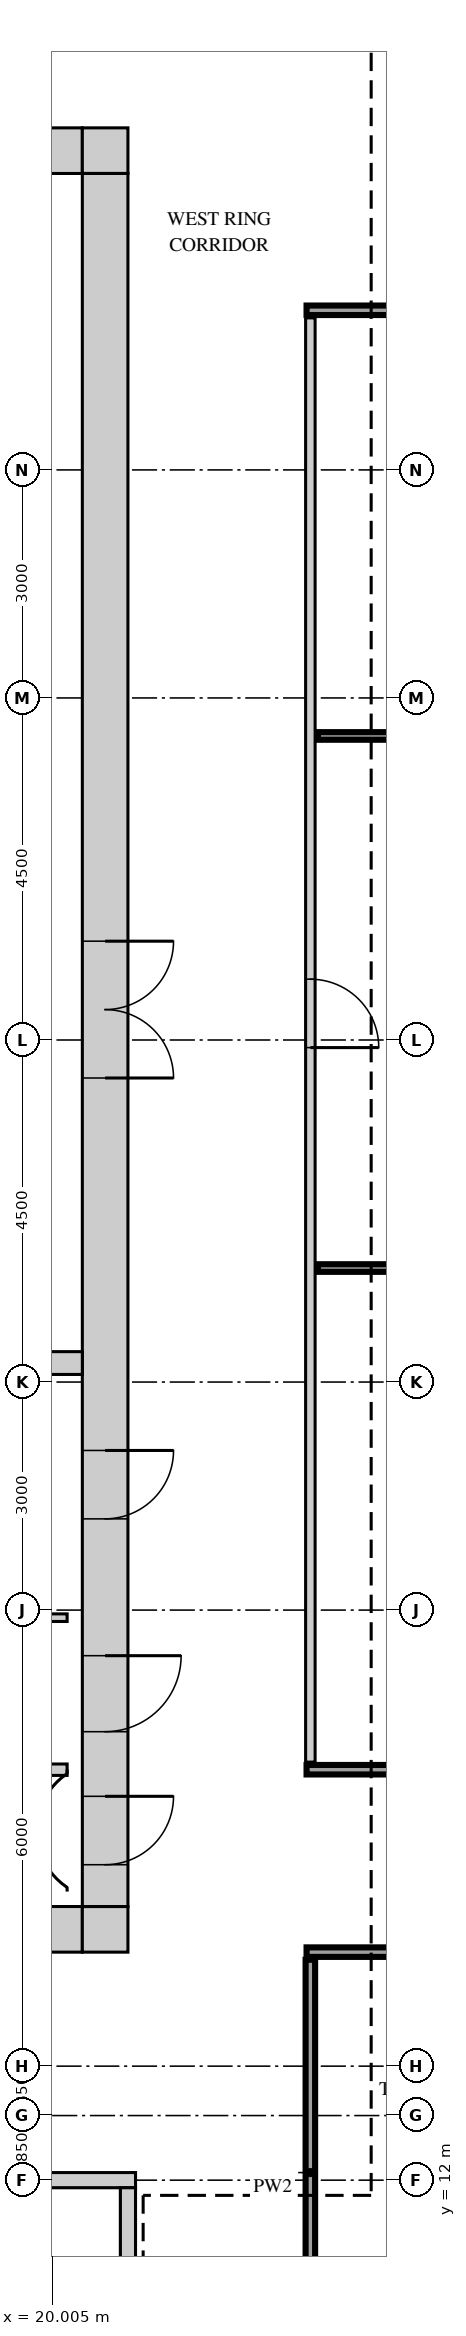
"""IFC4 building model, lengths in metres.
Left out: names, types, materials, properties, quantities, classifications, styles, units other than length and angle.
Written with IfcOpenShell. Run it as: python <this file> out.ifc"""

import sys

from ifc_helpers import new_model, si_unit, direction, frame, frame_2d, origin, place, context, subcontext, project, spatial, rectangle, extrude, source, transform, mapped, element, fill, save


model = new_model("IFC4")
c1 = context("Model", 3, precision=1e-05, world=origin(), true_north=direction((0.0, 1.0)))
c2 = subcontext(c1, "Body", "Model", "MODEL_VIEW")
j1 = project(units=[si_unit("LENGTHUNIT", "METRE"), si_unit("PLANEANGLEUNIT", "RADIAN")], contexts=[c1])
p1 = place(None, origin())
s1 = spatial("IfcSite", under=j1, at=p1, CompositionType="ELEMENT")
p2 = place(p1, origin())
s2 = spatial("IfcBuilding", under=s1, at=p2, CompositionType="ELEMENT")
p3 = place(p2, frame((0.0, 0.0, 286.2)))
s3 = spatial("IfcBuildingStorey", under=s2, at=p3, CompositionType="ELEMENT", Elevation=286.2)
m1 = source(origin(), c2, "Body", "SweptSolid", [
    extrude(rectangle(XDim=14.4, YDim=0.6, at=frame_2d((7.2, 0.0))), origin(), (0.0, 0.0, 1.0), 3.75),
])
p4 = place(p3, frame((6.0, 38.7, 0.0), z_axis=(0.0, 0.0, 1.0), x_axis=(1.0, 0.0, 0.0)))
e1 = element("IfcWall", 1, at=p4, inside=s3, PredefinedType="SHEAR", context=c2, shape_type="MappedRepresentation", body=[
    mapped(m1, transform((0.0, 0.0, 0.0))),
])
m2 = source(origin(), c2, "Body", "SweptSolid", [
    extrude(rectangle(XDim=0.9, YDim=2.1, at=frame_2d((0.45, 1.05))), frame((0.0, 0.31, 0.0), z_axis=(0.0, -1.0, 0.0), x_axis=(1.0, 0.0, 0.0)), (0.0, 0.0, 1.0), 0.62),
])
p5 = place(p4, frame((2.55, 0.0, 0.0)))
e2 = element("IfcOpeningElement", 2, at=p5, cuts=e1, PredefinedType="OPENING", context=c2, shape_type="MappedRepresentation", body=[
    mapped(m2, transform((0.0, 0.0, 0.0))),
])
p6 = place(p4, frame((7.0, 0.0, 0.0)))
e3 = element("IfcOpeningElement", 3, at=p6, cuts=e1, PredefinedType="OPENING", context=c2, shape_type="MappedRepresentation", body=[
    mapped(m2, transform((0.0, 0.0, 0.0))),
])
p7 = place(p4, frame((11.5, 0.0, 0.0)))
e4 = element("IfcOpeningElement", 4, at=p7, cuts=e1, PredefinedType="OPENING", context=c2, shape_type="MappedRepresentation", body=[
    mapped(m2, transform((0.0, 0.0, 0.0))),
])
m3 = source(origin(), c2, "Body", "SweptSolid", [
    extrude(rectangle(XDim=0.6, YDim=0.6, at=frame_2d((0.3, 0.0))), origin(), (0.0, 0.0, 1.0), 3.75),
])
p8 = place(p3, frame((20.4, 38.7, 0.0), z_axis=(0.0, 0.0, 1.0), x_axis=(1.0, 0.0, 0.0)))
e5 = element("IfcWall", 5, at=p8, inside=s3, PredefinedType="SHEAR", context=c2, shape_type="MappedRepresentation", body=[
    mapped(m3, transform((0.0, 0.0, 0.0))),
])
p9 = place(p3, frame((6.0, 15.3, 0.0), z_axis=(0.0, 0.0, 1.0), x_axis=(1.0, 0.0, 0.0)))
e6 = element("IfcWall", 6, at=p9, inside=s3, PredefinedType="SHEAR", context=c2, shape_type="MappedRepresentation", body=[
    mapped(m1, transform((0.0, 0.0, 0.0))),
])
m4 = source(origin(), c2, "Body", "SweptSolid", [
    extrude(rectangle(XDim=1.2, YDim=2.1, at=frame_2d((0.6, 1.05))), frame((0.0, 0.31, 0.0), z_axis=(0.0, -1.0, 0.0), x_axis=(1.0, 0.0, 0.0)), (0.0, 0.0, 1.0), 0.62),
])
p10 = place(p9, frame((6.2, 0.0, 0.0)))
e7 = element("IfcOpeningElement", 7, at=p10, cuts=e6, PredefinedType="OPENING", context=c2, shape_type="MappedRepresentation", body=[
    mapped(m4, transform((0.0, 0.0, 0.0))),
])
p11 = place(p9, frame((2.85, 0.0, 0.0)))
e8 = element("IfcOpeningElement", 8, at=p11, cuts=e6, PredefinedType="OPENING", context=c2, shape_type="MappedRepresentation", body=[
    mapped(m4, transform((0.0, 0.0, 0.0))),
])
m5 = source(origin(), c2, "Body", "SweptSolid", [
    extrude(rectangle(XDim=1.0, YDim=2.1, at=frame_2d((0.5, 1.05))), frame((0.0, 0.31, 0.0), z_axis=(0.0, -1.0, 0.0), x_axis=(1.0, 0.0, 0.0)), (0.0, 0.0, 1.0), 0.62),
])
p12 = place(p9, frame((8.7, 0.0, 0.0)))
e9 = element("IfcOpeningElement", 9, at=p12, cuts=e6, PredefinedType="OPENING", context=c2, shape_type="MappedRepresentation", body=[
    mapped(m5, transform((0.0, 0.0, 0.0))),
])
p13 = place(p3, frame((20.4, 15.3, 0.0), z_axis=(0.0, 0.0, 1.0), x_axis=(1.0, 0.0, 0.0)))
e10 = element("IfcWall", 10, at=p13, inside=s3, PredefinedType="SHEAR", context=c2, shape_type="MappedRepresentation", body=[
    mapped(m3, transform((0.0, 0.0, 0.0))),
])
m6 = source(origin(), c2, "Body", "SweptSolid", [
    extrude(rectangle(XDim=22.8, YDim=0.6, at=frame_2d((11.4, 0.0))), origin(), (0.0, 0.0, 1.0), 3.75),
])
p14 = place(p3, frame((20.7, 15.6, 0.0), z_axis=(0.0, 0.0, 1.0), x_axis=(0.0, 1.0, 0.0)))
e11 = element("IfcWall", 11, at=p14, inside=s3, PredefinedType="SHEAR", context=c2, shape_type="MappedRepresentation", body=[
    mapped(m6, transform((0.0, 0.0, 0.0))),
])
m7 = source(origin(), c2, "Body", "SweptSolid", [
    extrude(rectangle(XDim=1.8, YDim=2.1, at=frame_2d((0.9, 1.05))), frame((0.0, 0.31, 0.0), z_axis=(0.0, -1.0, 0.0), x_axis=(1.0, 0.0, 0.0)), (0.0, 0.0, 1.0), 0.62),
])
p15 = place(p14, frame((10.9, 0.0, 0.0)))
e12 = element("IfcOpeningElement", 12, at=p15, cuts=e11, PredefinedType="OPENING", context=c2, shape_type="MappedRepresentation", body=[
    mapped(m7, transform((0.0, 0.0, 0.0))),
])
p16 = place(p14, frame((0.55, 0.0, 0.0)))
e13 = element("IfcOpeningElement", 13, at=p16, cuts=e11, PredefinedType="OPENING", context=c2, shape_type="MappedRepresentation", body=[
    mapped(m2, transform((0.0, 0.0, 0.0))),
])
p17 = place(p14, frame((2.3, 0.0, 0.0)))
e14 = element("IfcOpeningElement", 14, at=p17, cuts=e11, PredefinedType="OPENING", context=c2, shape_type="MappedRepresentation", body=[
    mapped(m5, transform((0.0, 0.0, 0.0))),
])
p18 = place(p14, frame((5.1, 0.0, 0.0)))
e15 = element("IfcOpeningElement", 15, at=p18, cuts=e11, PredefinedType="OPENING", context=c2, shape_type="MappedRepresentation", body=[
    mapped(m2, transform((0.0, 0.0, 0.0))),
])
m8 = source(origin(), c2, "Body", "SweptSolid", [
    extrude(rectangle(XDim=7.2, YDim=0.2, at=frame_2d((3.6, 0.0))), origin(), (0.0, 0.0, 1.0), 3.75),
])
p19 = place(p3, frame((13.9, 12.0, 0.0), z_axis=(0.0, 0.0, 1.0), x_axis=(1.0, 0.0, 0.0)))
e16 = element("IfcWall", 16, at=p19, inside=s3, PredefinedType="SHEAR", context=c2, shape_type="MappedRepresentation", body=[
    mapped(m8, transform((0.0, 0.0, 0.0))),
])
m9 = source(origin(), c2, "Body", "SweptSolid", [
    extrude(rectangle(XDim=3.35, YDim=0.2, at=frame_2d((1.675, 0.0))), origin(), (0.0, 0.0, 1.0), 3.75),
])
p20 = place(p3, frame((21.0, 8.55, 0.0), z_axis=(0.0, 0.0, 1.0), x_axis=(0.0, 1.0, 0.0)))
e17 = element("IfcWall", 17, at=p20, inside=s3, PredefinedType="SHEAR", context=c2, shape_type="MappedRepresentation", body=[
    mapped(m9, transform((0.0, 0.0, 0.0))),
])
m10 = source(origin(), c2, "Body", "SweptSolid", [
    extrude(rectangle(XDim=13.2, YDim=0.3, at=frame_2d((6.6, 0.0))), origin(), (0.0, 0.0, 1.0), 3.75),
])
p21 = place(p3, frame((7.2, 22.75, 0.0), z_axis=(0.0, 0.0, 1.0), x_axis=(1.0, 0.0, 0.0)))
e18 = element("IfcWall", 18, at=p21, inside=s3, PredefinedType="STANDARD", context=c2, shape_type="MappedRepresentation", body=[
    mapped(m10, transform((0.0, 0.0, 0.0))),
])
m11 = source(origin(), c2, "Body", "SweptSolid", [
    extrude(rectangle(XDim=8.75, YDim=0.125, at=frame_2d((4.375, 0.0))), origin(), (0.0, 0.0, 1.0), 3.8),
])
p22 = place(p3, frame((23.4, 6.15, 0.0), z_axis=(0.0, 0.0, 1.0), x_axis=(0.0, 1.0, 0.0)))
e19 = element("IfcWall", 19, at=p22, inside=s3, PredefinedType="PARTITIONING", context=c2, shape_type="MappedRepresentation", body=[
    mapped(m11, transform((0.0, 0.0, 0.0))),
])
m12 = source(origin(), c2, "Body", "SweptSolid", [
    extrude(rectangle(XDim=0.9, YDim=2.1, at=frame_2d((0.45, 1.05))), frame((0.0, 0.073, 0.0), z_axis=(0.0, -1.0, 0.0), x_axis=(1.0, 0.0, 0.0)), (0.0, 0.0, 1.0), 0.145),
])
p23 = place(p22, frame((2.25, 0.0, 0.0)))
e20 = element("IfcOpeningElement", 20, at=p23, cuts=e19, PredefinedType="OPENING", context=c2, shape_type="MappedRepresentation", body=[
    mapped(m12, transform((0.0, 0.0, 0.0))),
])
m13 = source(origin(), c2, "Body", "SweptSolid", [
    extrude(rectangle(XDim=19.1, YDim=0.125, at=frame_2d((9.55, 0.0))), origin(), (0.0, 0.0, 1.0), 3.8),
])
p24 = place(p3, frame((23.35, 15.0, 0.0), z_axis=(0.0, 0.0, 1.0), x_axis=(1.0, 0.0, 0.0)))
e21 = element("IfcWall", 21, at=p24, inside=s3, PredefinedType="PARTITIONING", context=c2, shape_type="MappedRepresentation", body=[
    mapped(m13, transform((0.0, 0.0, 0.0))),
])
p25 = place(p24, frame((7.1, 0.0, 0.0)))
e22 = element("IfcOpeningElement", 22, at=p25, cuts=e21, PredefinedType="OPENING", context=c2, shape_type="MappedRepresentation", body=[
    mapped(m12, transform((0.0, 0.0, 0.0))),
])
p26 = place(p24, frame((13.3, 0.0, 0.0)))
e23 = element("IfcOpeningElement", 23, at=p26, cuts=e21, PredefinedType="OPENING", context=c2, shape_type="MappedRepresentation", body=[
    mapped(m12, transform((0.0, 0.0, 0.0))),
])
m14 = source(origin(), c2, "Body", "SweptSolid", [
    extrude(rectangle(XDim=4.0, YDim=0.15, at=frame_2d((2.0, 0.0))), origin(), (0.0, 0.0, 1.0), 3.8),
])
p27 = place(p3, frame((16.2, 17.4, 0.0), z_axis=(0.0, 0.0, 1.0), x_axis=(1.0, 0.0, 0.0)))
e24 = element("IfcWall", 24, at=p27, inside=s3, PredefinedType="PARTITIONING", context=c2, shape_type="MappedRepresentation", body=[
    mapped(m14, transform((0.0, 0.0, 0.0))),
])
m15 = source(origin(), c2, "Body", "SweptSolid", [
    extrude(rectangle(XDim=16.7, YDim=0.125, at=frame_2d((8.35, 0.0))), origin(), (0.0, 0.0, 1.0), 3.8),
])
p28 = place(p3, frame((23.35, 17.4, 0.0), z_axis=(0.0, 0.0, 1.0), x_axis=(1.0, 0.0, 0.0)))
e25 = element("IfcWall", 25, at=p28, inside=s3, PredefinedType="PARTITIONING", context=c2, shape_type="MappedRepresentation", body=[
    mapped(m15, transform((0.0, 0.0, 0.0))),
])
p29 = place(p28, frame((8.05, 0.0, 0.0)))
e26 = element("IfcOpeningElement", 26, at=p29, cuts=e25, PredefinedType="OPENING", context=c2, shape_type="MappedRepresentation", body=[
    mapped(m12, transform((0.0, 0.0, 0.0))),
])
m16 = source(origin(), c2, "Body", "SweptSolid", [
    extrude(rectangle(XDim=19.0, YDim=0.125, at=frame_2d((9.5, 0.0))), origin(), (0.0, 0.0, 1.0), 3.8),
])
p30 = place(p3, frame((23.4, 17.5, 0.0), z_axis=(0.0, 0.0, 1.0), x_axis=(0.0, 1.0, 0.0)))
e27 = element("IfcWall", 27, at=p30, inside=s3, PredefinedType="PARTITIONING", context=c2, shape_type="MappedRepresentation", body=[
    mapped(m16, transform((0.0, 0.0, 0.0))),
])
p31 = place(p30, frame((9.4, 0.0, 0.0)))
e28 = element("IfcOpeningElement", 28, at=p31, cuts=e27, PredefinedType="OPENING", context=c2, shape_type="MappedRepresentation", body=[
    mapped(m12, transform((0.0, 0.0, 0.0))),
])
m17 = source(origin(), c2, "Body", "SweptSolid", [
    extrude(rectangle(XDim=4.1, YDim=0.1, at=frame_2d((2.05, 0.0))), origin(), (0.0, 0.0, 1.0), 3.8),
])
p32 = place(p3, frame((16.1, 19.4, 0.0), z_axis=(0.0, 0.0, 1.0), x_axis=(1.0, 0.0, 0.0)))
e29 = element("IfcWall", 29, at=p32, inside=s3, PredefinedType="PARTITIONING", context=c2, shape_type="MappedRepresentation", body=[
    mapped(m17, transform((0.0, 0.0, 0.0))),
])
m18 = source(origin(), c2, "Body", "SweptSolid", [
    extrude(rectangle(XDim=16.4, YDim=0.1, at=frame_2d((8.2, 0.0))), origin(), (0.0, 0.0, 1.0), 3.8),
])
for number, where, z_axis, x_axis in (
    (30, (23.5, 24.0, 0.0), (0.0, 0.0, 1.0), (1.0, 0.0, 0.0)),
    (31, (23.5, 31.0, 0.0), (0.0, 0.0, 1.0), (1.0, 0.0, 0.0)),
):
    element("IfcWall", number, at=place(p3, frame(where, z_axis=z_axis, x_axis=x_axis)), inside=s3, PredefinedType="PARTITIONING", context=c2, shape_type="MappedRepresentation", body=[
        mapped(m18, transform((0.0, 0.0, 0.0))),
    ])
p33 = place(p3, frame((23.35, 36.6, 0.0), z_axis=(0.0, 0.0, 1.0), x_axis=(1.0, 0.0, 0.0)))
e32 = element("IfcWall", 32, at=p33, inside=s3, PredefinedType="PARTITIONING", context=c2, shape_type="MappedRepresentation", body=[
    mapped(m15, transform((0.0, 0.0, 0.0))),
])
p34 = place(p33, frame((8.05, 0.0, 0.0)))
e33 = element("IfcOpeningElement", 33, at=p34, cuts=e32, PredefinedType="OPENING", context=c2, shape_type="MappedRepresentation", body=[
    mapped(m12, transform((0.0, 0.0, 0.0))),
])
m19 = source(origin(), c2, "Body", "SweptSolid", [
    extrude(rectangle(XDim=1.8, YDim=2.1, at=frame_2d((0.9, 1.05))), frame((0.0, 0.25, 0.0), z_axis=(0.0, -1.0, 0.0), x_axis=(1.0, 0.0, 0.0)), (0.0, 0.0, 1.0), 0.5),
])
p35 = place(p15, origin())
e34 = element("IfcDoor", 34, at=p35, inside=s3, OperationType="DOUBLE_DOOR_SINGLE_SWING", PredefinedType="DOOR", context=c2, shape_type="MappedRepresentation", body=[
    mapped(m19, transform((0.0, 0.0, 0.0))),
])
fill(e12, e34)
m20 = source(origin(), c2, "Body", "SweptSolid", [
    extrude(rectangle(XDim=0.9, YDim=2.1, at=frame_2d((0.45, 1.05))), frame((0.0, 0.25, 0.0), z_axis=(0.0, -1.0, 0.0), x_axis=(1.0, 0.0, 0.0)), (0.0, 0.0, 1.0), 0.5),
])
p36 = place(p16, origin())
e35 = element("IfcDoor", 35, at=p36, inside=s3, OperationType="SINGLE_SWING_RIGHT", PredefinedType="DOOR", context=c2, shape_type="MappedRepresentation", body=[
    mapped(m20, transform((0.0, 0.0, 0.0))),
])
fill(e13, e35)
m21 = source(origin(), c2, "Body", "SweptSolid", [
    extrude(rectangle(XDim=1.0, YDim=2.1, at=frame_2d((0.5, 1.05))), frame((0.0, 0.25, 0.0), z_axis=(0.0, -1.0, 0.0), x_axis=(1.0, 0.0, 0.0)), (0.0, 0.0, 1.0), 0.5),
])
p37 = place(p17, origin())
e36 = element("IfcDoor", 36, at=p37, inside=s3, OperationType="SINGLE_SWING_RIGHT", PredefinedType="DOOR", context=c2, shape_type="MappedRepresentation", body=[
    mapped(m21, transform((0.0, 0.0, 0.0))),
])
fill(e14, e36)
p38 = place(p18, origin())
e37 = element("IfcDoor", 37, at=p38, inside=s3, OperationType="SINGLE_SWING_RIGHT", PredefinedType="DOOR", context=c2, shape_type="MappedRepresentation", body=[
    mapped(m20, transform((0.0, 0.0, 0.0))),
])
fill(e15, e37)
m22 = source(origin(), c2, "Body", "SweptSolid", [
    extrude(rectangle(XDim=0.9, YDim=2.1, at=frame_2d((0.45, 1.05))), frame((0.0, 0.025, 0.0), z_axis=(0.0, -1.0, 0.0), x_axis=(1.0, 0.0, 0.0)), (0.0, 0.0, 1.0), 0.05),
])
p39 = place(p31, origin())
e38 = element("IfcDoor", 38, at=p39, inside=s3, OperationType="SINGLE_SWING_LEFT", PredefinedType="DOOR", context=c2, shape_type="MappedRepresentation", body=[
    mapped(m22, transform((0.0, 0.0, 0.0))),
])
fill(e28, e38)
save(model, sys.argv[1])
